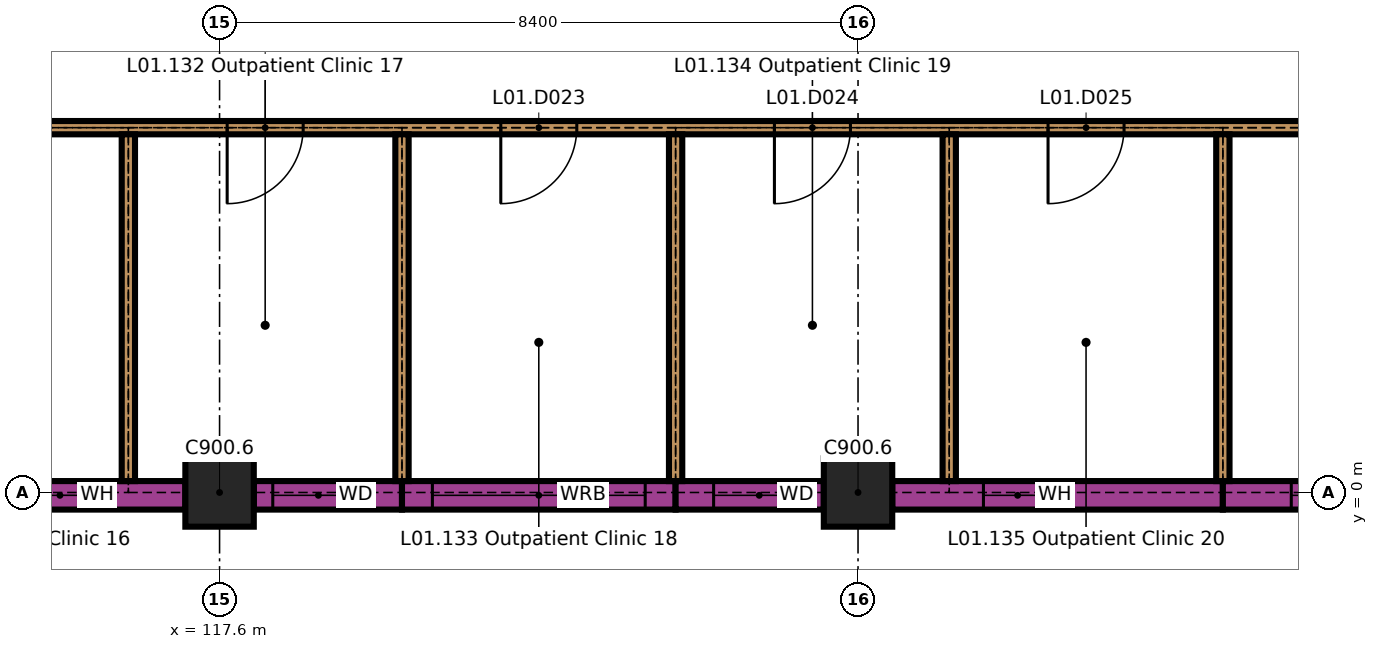
"""IFC4 building model, lengths in metres.
Left out: names, types, materials, properties, quantities, classifications, styles, units other than length and angle.
Written with IfcOpenShell. Run it as: python <this file> out.ifc"""

import sys

from ifc_helpers import new_model, si_unit, direction, frame, frame_2d, origin, origin_2d, place, context, subcontext, project, spatial, rectangle, extrude, element, fill, save


model = new_model("IFC4")
c1 = context("Model", 3, precision=1e-05, world=origin(), true_north=direction((0.0, 1.0)))
c2 = subcontext(c1, "Body", "Model", "MODEL_VIEW")
j1 = project(units=[si_unit("LENGTHUNIT", "METRE"), si_unit("PLANEANGLEUNIT", "RADIAN")], contexts=[c1])
p1 = place(None, origin())
s1 = spatial("IfcSite", under=j1, at=p1, CompositionType="ELEMENT")
p2 = place(p1, origin())
s2 = spatial("IfcBuilding", under=s1, at=p2, CompositionType="ELEMENT")
p3 = place(p2, frame((0.0, 0.0, 4.5)))
s3 = spatial("IfcBuildingStorey", under=s2, at=p3, CompositionType="ELEMENT", Elevation=4.5)
for number, where, z_axis, x_axis in (
    (1, (117.6, 0.0, 0.0), (0.0, 0.0, 1.0), (1.0, 0.0, 0.0)),
    (2, (126.0, 0.0, 0.0), (0.0, 0.0, 1.0), (1.0, 0.0, 0.0)),
):
    element("IfcColumn", number, at=place(p3, frame(where, z_axis=z_axis, x_axis=x_axis)), inside=s3, PredefinedType="COLUMN", context=c2, shape_type="SweptSolid", body=[
        extrude(rectangle(XDim=0.9, YDim=0.9, at=origin_2d()), origin(), (0.0, 0.0, 1.0), 3.45),
    ])
p4 = place(p3, frame((112.8, -0.038, 0.0), z_axis=(0.0, 0.0, 1.0), x_axis=(1.0, 0.0, 0.0)))
e3 = element("IfcWall", 3, at=p4, inside=s3, PredefinedType="SOLIDWALL", context=c2, shape_type="SweptSolid", body=[
    extrude(rectangle(XDim=4.35, YDim=0.375, at=frame_2d((2.175, 0.0))), origin(), (0.0, 0.0, 1.0), 3.15),
])
p5 = place(p4, frame((2.25, 0.0, 0.9)))
e4 = element("IfcOpeningElement", 4, at=p5, cuts=e3, PredefinedType="OPENING", context=c2, shape_type="SweptSolid", body=[
    extrude(rectangle(XDim=0.9, YDim=1.5, at=frame_2d((0.45, 0.75))), frame((0.0, 0.198, 0.0), z_axis=(0.0, -1.0, 0.0), x_axis=(1.0, 0.0, 0.0)), (0.0, 0.0, 1.0), 0.395),
])
p6 = place(p3, frame((118.05, -0.038, 0.0), z_axis=(0.0, 0.0, 1.0), x_axis=(1.0, 0.0, 0.0)))
e5 = element("IfcWall", 5, at=p6, inside=s3, PredefinedType="SOLIDWALL", context=c2, shape_type="SweptSolid", body=[
    extrude(rectangle(XDim=1.95, YDim=0.375, at=frame_2d((0.975, 0.0))), origin(), (0.0, 0.0, 1.0), 3.15),
])
p7 = place(p6, frame((0.25, 0.0, 0.9)))
e6 = element("IfcOpeningElement", 6, at=p7, cuts=e5, PredefinedType="OPENING", context=c2, shape_type="SweptSolid", body=[
    extrude(rectangle(XDim=1.2, YDim=1.5, at=frame_2d((0.6, 0.75))), frame((0.0, 0.198, 0.0), z_axis=(0.0, -1.0, 0.0), x_axis=(1.0, 0.0, 0.0)), (0.0, 0.0, 1.0), 0.395),
])
p8 = place(p3, frame((120.0, -0.038, 0.0), z_axis=(0.0, 0.0, 1.0), x_axis=(1.0, 0.0, 0.0)))
e7 = element("IfcWall", 7, at=p8, inside=s3, PredefinedType="SOLIDWALL", context=c2, shape_type="SweptSolid", body=[
    extrude(rectangle(XDim=3.6, YDim=0.375, at=frame_2d((1.8, 0.0))), origin(), (0.0, 0.0, 1.0), 3.15),
])
p9 = place(p8, frame((0.4, 0.0, 1.0)))
e8 = element("IfcOpeningElement", 8, at=p9, cuts=e7, PredefinedType="OPENING", context=c2, shape_type="SweptSolid", body=[
    extrude(rectangle(XDim=2.8, YDim=1.2, at=frame_2d((1.4, 0.6))), frame((0.0, 0.198, 0.0), z_axis=(0.0, -1.0, 0.0), x_axis=(1.0, 0.0, 0.0)), (0.0, 0.0, 1.0), 0.395),
])
p10 = place(p3, frame((123.6, -0.038, 0.0), z_axis=(0.0, 0.0, 1.0), x_axis=(1.0, 0.0, 0.0)))
e9 = element("IfcWall", 9, at=p10, inside=s3, PredefinedType="SOLIDWALL", context=c2, shape_type="SweptSolid", body=[
    extrude(rectangle(XDim=1.95, YDim=0.375, at=frame_2d((0.975, 0.0))), origin(), (0.0, 0.0, 1.0), 3.15),
])
p11 = place(p10, frame((0.5, 0.0, 0.9)))
e10 = element("IfcOpeningElement", 10, at=p11, cuts=e9, PredefinedType="OPENING", context=c2, shape_type="SweptSolid", body=[
    extrude(rectangle(XDim=1.2, YDim=1.5, at=frame_2d((0.6, 0.75))), frame((0.0, 0.198, 0.0), z_axis=(0.0, -1.0, 0.0), x_axis=(1.0, 0.0, 0.0)), (0.0, 0.0, 1.0), 0.395),
])
p12 = place(p3, frame((126.45, -0.038, 0.0), z_axis=(0.0, 0.0, 1.0), x_axis=(1.0, 0.0, 0.0)))
e11 = element("IfcWall", 11, at=p12, inside=s3, PredefinedType="SOLIDWALL", context=c2, shape_type="SweptSolid", body=[
    extrude(rectangle(XDim=4.35, YDim=0.375, at=frame_2d((2.175, 0.0))), origin(), (0.0, 0.0, 1.0), 3.15),
])
p13 = place(p12, frame((1.2, 0.0, 0.9)))
e12 = element("IfcOpeningElement", 12, at=p13, cuts=e11, PredefinedType="OPENING", context=c2, shape_type="SweptSolid", body=[
    extrude(rectangle(XDim=0.9, YDim=1.5, at=frame_2d((0.45, 0.75))), frame((0.0, 0.198, 0.0), z_axis=(0.0, -1.0, 0.0), x_axis=(1.0, 0.0, 0.0)), (0.0, 0.0, 1.0), 0.395),
])
p14 = place(p3, frame((130.8, -0.038, 0.0), z_axis=(0.0, 0.0, 1.0), x_axis=(1.0, 0.0, 0.0)))
e13 = element("IfcWall", 13, at=p14, inside=s3, PredefinedType="SOLIDWALL", context=c2, shape_type="SweptSolid", body=[
    extrude(rectangle(XDim=3.6, YDim=0.375, at=frame_2d((1.8, 0.0))), origin(), (0.0, 0.0, 1.0), 3.15),
])
p15 = place(p14, frame((0.9, 0.0, 0.9)))
e14 = element("IfcOpeningElement", 14, at=p15, cuts=e13, PredefinedType="OPENING", context=c2, shape_type="SweptSolid", body=[
    extrude(rectangle(XDim=1.2, YDim=1.5, at=frame_2d((0.6, 0.75))), frame((0.0, 0.198, 0.0), z_axis=(0.0, -1.0, 0.0), x_axis=(1.0, 0.0, 0.0)), (0.0, 0.0, 1.0), 0.395),
])
p16 = place(p3, frame((109.3, 4.8, 0.0), z_axis=(0.0, 0.0, 1.0), x_axis=(1.0, 0.0, 0.0)))
e15 = element("IfcWall", 15, at=p16, inside=s3, PredefinedType="PARTITIONING", context=c2, shape_type="SweptSolid", body=[
    extrude(rectangle(XDim=25.0, YDim=0.175, at=frame_2d((12.5, 0.0))), origin(), (0.0, 0.0, 1.0), 3.45),
])
p17 = place(p16, frame((1.25, 0.0, 0.0)))
e16 = element("IfcOpeningElement", 16, at=p17, cuts=e15, PredefinedType="OPENING", context=c2, shape_type="SweptSolid", body=[
    extrude(rectangle(XDim=1.0, YDim=2.1, at=frame_2d((0.5, 1.05))), frame((0.0, 0.097, 0.0), z_axis=(0.0, -1.0, 0.0), x_axis=(1.0, 0.0, 0.0)), (0.0, 0.0, 1.0), 0.195),
])
p18 = place(p16, frame((4.8, 0.0, 0.0)))
e17 = element("IfcOpeningElement", 17, at=p18, cuts=e15, PredefinedType="OPENING", context=c2, shape_type="SweptSolid", body=[
    extrude(rectangle(XDim=1.0, YDim=2.1, at=frame_2d((0.5, 1.05))), frame((0.0, 0.097, 0.0), z_axis=(0.0, -1.0, 0.0), x_axis=(1.0, 0.0, 0.0)), (0.0, 0.0, 1.0), 0.195),
])
p19 = place(p16, frame((8.4, 0.0, 0.0)))
e18 = element("IfcOpeningElement", 18, at=p19, cuts=e15, PredefinedType="OPENING", context=c2, shape_type="SweptSolid", body=[
    extrude(rectangle(XDim=1.0, YDim=2.1, at=frame_2d((0.5, 1.05))), frame((0.0, 0.097, 0.0), z_axis=(0.0, -1.0, 0.0), x_axis=(1.0, 0.0, 0.0)), (0.0, 0.0, 1.0), 0.195),
])
p20 = place(p16, frame((12.0, 0.0, 0.0)))
e19 = element("IfcOpeningElement", 19, at=p20, cuts=e15, PredefinedType="OPENING", context=c2, shape_type="SweptSolid", body=[
    extrude(rectangle(XDim=1.0, YDim=2.1, at=frame_2d((0.5, 1.05))), frame((0.0, 0.097, 0.0), z_axis=(0.0, -1.0, 0.0), x_axis=(1.0, 0.0, 0.0)), (0.0, 0.0, 1.0), 0.195),
])
p21 = place(p16, frame((15.6, 0.0, 0.0)))
e20 = element("IfcOpeningElement", 20, at=p21, cuts=e15, PredefinedType="OPENING", context=c2, shape_type="SweptSolid", body=[
    extrude(rectangle(XDim=1.0, YDim=2.1, at=frame_2d((0.5, 1.05))), frame((0.0, 0.097, 0.0), z_axis=(0.0, -1.0, 0.0), x_axis=(1.0, 0.0, 0.0)), (0.0, 0.0, 1.0), 0.195),
])
p22 = place(p16, frame((19.2, 0.0, 0.0)))
e21 = element("IfcOpeningElement", 21, at=p22, cuts=e15, PredefinedType="OPENING", context=c2, shape_type="SweptSolid", body=[
    extrude(rectangle(XDim=1.0, YDim=2.1, at=frame_2d((0.5, 1.05))), frame((0.0, 0.097, 0.0), z_axis=(0.0, -1.0, 0.0), x_axis=(1.0, 0.0, 0.0)), (0.0, 0.0, 1.0), 0.195),
])
p23 = place(p16, frame((22.75, 0.0, 0.0)))
e22 = element("IfcOpeningElement", 22, at=p23, cuts=e15, PredefinedType="OPENING", context=c2, shape_type="SweptSolid", body=[
    extrude(rectangle(XDim=1.0, YDim=2.1, at=frame_2d((0.5, 1.05))), frame((0.0, 0.097, 0.0), z_axis=(0.0, -1.0, 0.0), x_axis=(1.0, 0.0, 0.0)), (0.0, 0.0, 1.0), 0.195),
])
for number, where, z_axis, x_axis in (
    (23, (116.4, 0.15, 0.0), (0.0, 0.0, 1.0), (0.0, 1.0, 0.0)),
    (24, (120.0, 0.15, 0.0), (0.0, 0.0, 1.0), (0.0, 1.0, 0.0)),
    (25, (123.6, 0.15, 0.0), (0.0, 0.0, 1.0), (0.0, 1.0, 0.0)),
    (26, (127.2, 0.15, 0.0), (0.0, 0.0, 1.0), (0.0, 1.0, 0.0)),
    (27, (130.8, 0.15, 0.0), (0.0, 0.0, 1.0), (0.0, 1.0, 0.0)),
):
    element("IfcWall", number, at=place(p3, frame(where, z_axis=z_axis, x_axis=x_axis)), inside=s3, PredefinedType="PARTITIONING", context=c2, shape_type="SweptSolid", body=[
        extrude(rectangle(XDim=4.562, YDim=0.175, at=frame_2d((2.281, 0.0))), origin(), (0.0, 0.0, 1.0), 3.45),
    ])
p24 = place(p5, origin())
e28 = element("IfcWindow", 28, at=p24, inside=s3, PartitioningType="SINGLE_PANEL", PredefinedType="WINDOW", context=c2, shape_type="SweptSolid", body=[
    extrude(rectangle(XDim=0.9, YDim=1.5, at=frame_2d((0.45, 0.75))), frame((0.0, 0.03, 0.0), z_axis=(0.0, -1.0, 0.0), x_axis=(1.0, 0.0, 0.0)), (0.0, 0.0, 1.0), 0.06),
])
fill(e4, e28)
p25 = place(p7, origin())
e29 = element("IfcWindow", 29, at=p25, inside=s3, PartitioningType="SINGLE_PANEL", PredefinedType="WINDOW", context=c2, shape_type="SweptSolid", body=[
    extrude(rectangle(XDim=1.2, YDim=1.5, at=frame_2d((0.6, 0.75))), frame((0.0, 0.03, 0.0), z_axis=(0.0, -1.0, 0.0), x_axis=(1.0, 0.0, 0.0)), (0.0, 0.0, 1.0), 0.06),
])
fill(e6, e29)
p26 = place(p9, origin())
e30 = element("IfcWindow", 30, at=p26, inside=s3, PartitioningType="DOUBLE_PANEL_VERTICAL", PredefinedType="WINDOW", context=c2, shape_type="SweptSolid", body=[
    extrude(rectangle(XDim=2.8, YDim=1.2, at=frame_2d((1.4, 0.6))), frame((0.0, 0.03, 0.0), z_axis=(0.0, -1.0, 0.0), x_axis=(1.0, 0.0, 0.0)), (0.0, 0.0, 1.0), 0.06),
])
fill(e8, e30)
p27 = place(p11, origin())
e31 = element("IfcWindow", 31, at=p27, inside=s3, PartitioningType="SINGLE_PANEL", PredefinedType="WINDOW", context=c2, shape_type="SweptSolid", body=[
    extrude(rectangle(XDim=1.2, YDim=1.5, at=frame_2d((0.6, 0.75))), frame((0.0, 0.03, 0.0), z_axis=(0.0, -1.0, 0.0), x_axis=(1.0, 0.0, 0.0)), (0.0, 0.0, 1.0), 0.06),
])
fill(e10, e31)
p28 = place(p13, origin())
e32 = element("IfcWindow", 32, at=p28, inside=s3, PartitioningType="SINGLE_PANEL", PredefinedType="WINDOW", context=c2, shape_type="SweptSolid", body=[
    extrude(rectangle(XDim=0.9, YDim=1.5, at=frame_2d((0.45, 0.75))), frame((0.0, 0.03, 0.0), z_axis=(0.0, -1.0, 0.0), x_axis=(1.0, 0.0, 0.0)), (0.0, 0.0, 1.0), 0.06),
])
fill(e12, e32)
p29 = place(p15, origin())
e33 = element("IfcWindow", 33, at=p29, inside=s3, PartitioningType="SINGLE_PANEL", PredefinedType="WINDOW", context=c2, shape_type="SweptSolid", body=[
    extrude(rectangle(XDim=1.2, YDim=1.5, at=frame_2d((0.6, 0.75))), frame((0.0, 0.03, 0.0), z_axis=(0.0, -1.0, 0.0), x_axis=(1.0, 0.0, 0.0)), (0.0, 0.0, 1.0), 0.06),
])
fill(e14, e33)
p30 = place(p19, origin())
e34 = element("IfcDoor", 34, at=p30, inside=s3, OperationType="SINGLE_SWING_LEFT", PredefinedType="DOOR", context=c2, shape_type="SweptSolid", body=[
    extrude(rectangle(XDim=1.0, YDim=2.1, at=frame_2d((0.5, 1.05))), frame((0.0, 0.035, 0.0), z_axis=(0.0, -1.0, 0.0), x_axis=(1.0, 0.0, 0.0)), (0.0, 0.0, 1.0), 0.07),
])
fill(e18, e34)
p31 = place(p20, origin())
e35 = element("IfcDoor", 35, at=p31, inside=s3, OperationType="SINGLE_SWING_LEFT", PredefinedType="DOOR", context=c2, shape_type="SweptSolid", body=[
    extrude(rectangle(XDim=1.0, YDim=2.1, at=frame_2d((0.5, 1.05))), frame((0.0, 0.035, 0.0), z_axis=(0.0, -1.0, 0.0), x_axis=(1.0, 0.0, 0.0)), (0.0, 0.0, 1.0), 0.07),
])
fill(e19, e35)
p32 = place(p21, origin())
e36 = element("IfcDoor", 36, at=p32, inside=s3, OperationType="SINGLE_SWING_LEFT", PredefinedType="DOOR", context=c2, shape_type="SweptSolid", body=[
    extrude(rectangle(XDim=1.0, YDim=2.1, at=frame_2d((0.5, 1.05))), frame((0.0, 0.035, 0.0), z_axis=(0.0, -1.0, 0.0), x_axis=(1.0, 0.0, 0.0)), (0.0, 0.0, 1.0), 0.07),
])
fill(e20, e36)
p33 = place(p22, origin())
e37 = element("IfcDoor", 37, at=p33, inside=s3, OperationType="SINGLE_SWING_LEFT", PredefinedType="DOOR", context=c2, shape_type="SweptSolid", body=[
    extrude(rectangle(XDim=1.0, YDim=2.1, at=frame_2d((0.5, 1.05))), frame((0.0, 0.035, 0.0), z_axis=(0.0, -1.0, 0.0), x_axis=(1.0, 0.0, 0.0)), (0.0, 0.0, 1.0), 0.07),
])
fill(e21, e37)
save(model, sys.argv[1])
